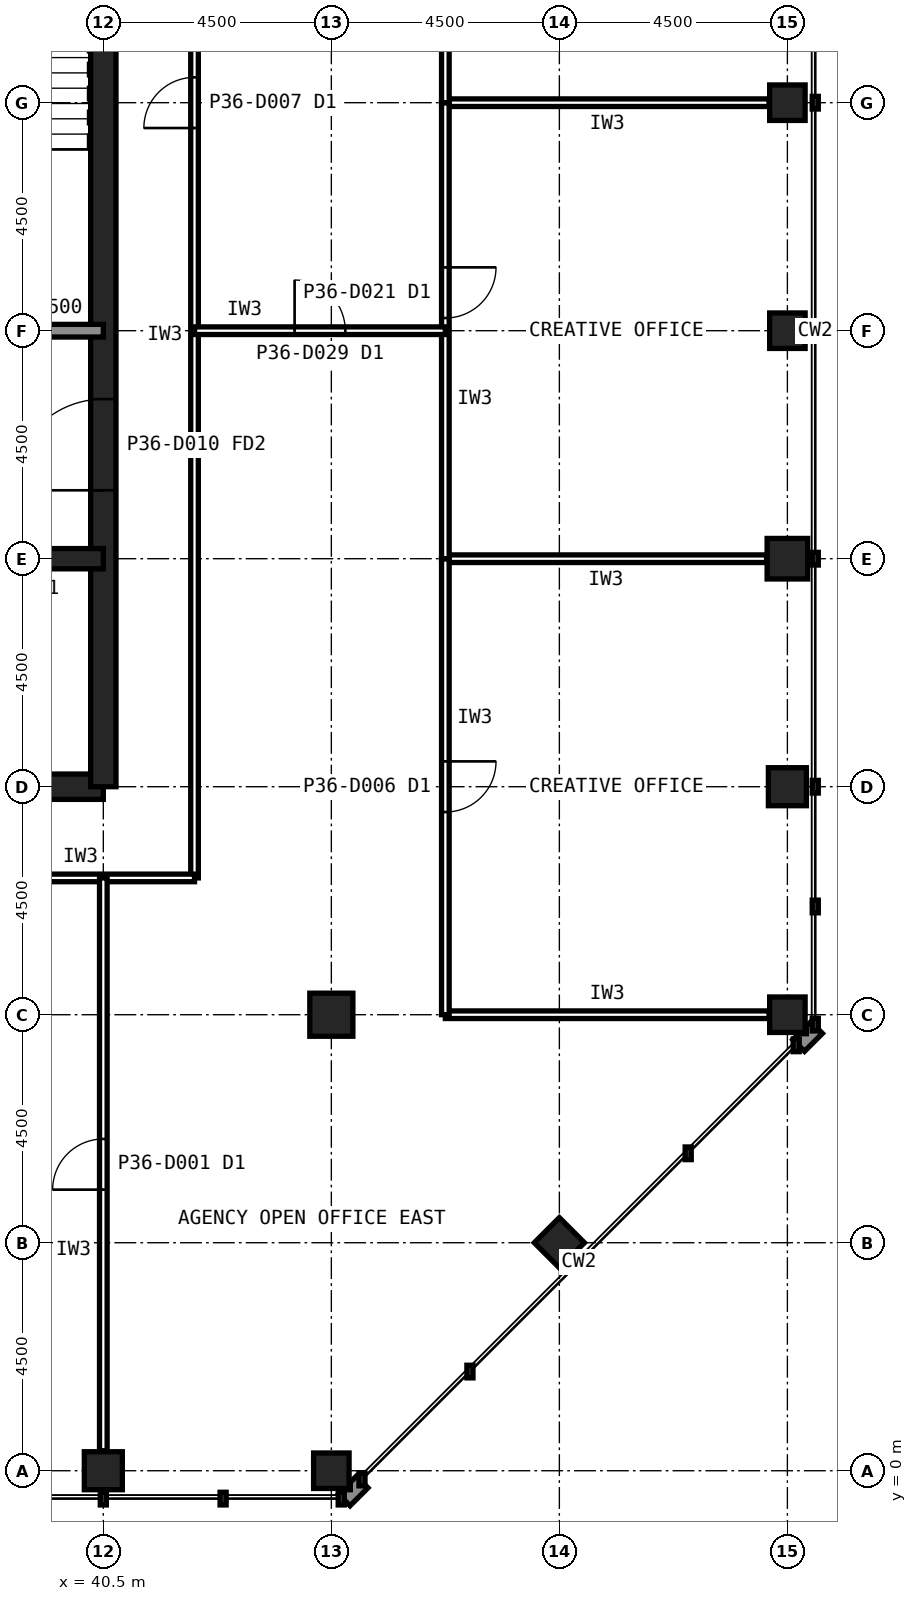
"""IFC4 building model, lengths in metres.
Left out: names, types, materials, properties, quantities, classifications, styles, units other than length and angle.
Written with IfcOpenShell. Run it as: python <this file> out.ifc"""

import sys

from ifc_helpers import new_model, si_unit, direction, frame, frame_2d, origin, origin_2d, place, context, subcontext, project, spatial, rectangle, hollow_rectangle, extrude, element, fill, save


model = new_model("IFC4")
c1 = context("Model", 3, precision=1e-05, world=origin(), true_north=direction((0.0, 1.0)))
c2 = subcontext(c1, "Body", "Model", "MODEL_VIEW")
j1 = project(units=[si_unit("LENGTHUNIT", "METRE"), si_unit("PLANEANGLEUNIT", "RADIAN")], contexts=[c1])
p1 = place(None, origin())
s1 = spatial("IfcSite", under=j1, at=p1, CompositionType="ELEMENT")
p2 = place(p1, origin())
s2 = spatial("IfcBuilding", under=s1, at=p2, CompositionType="ELEMENT")
p3 = place(p2, frame((0.0, 0.0, 151.6)))
s3 = spatial("IfcBuildingStorey", under=s2, at=p3, CompositionType="ELEMENT", Elevation=151.6)
p4 = place(p3, frame((40.5, 0.0, 0.0), z_axis=(0.0, 0.0, 1.0), x_axis=(1.0, 0.0, 0.0)))
e1 = element("IfcColumn", 1, at=p4, inside=s3, PredefinedType="COLUMN", context=c2, shape_type="SweptSolid", body=[
    extrude(hollow_rectangle(XDim=0.8, YDim=0.8, WallThickness=0.045, at=origin_2d()), origin(), (0.0, 0.0, 1.0), 4.0),
])
for number, where, z_axis, x_axis in (
    (2, (45.0, 0.0, 0.0), (0.0, 0.0, 1.0), (1.0, 0.0, 0.0)),
    (3, (54.0, 9.0, 0.0), (0.0, 0.0, 1.0), (1.0, 0.0, 0.0)),
):
    element("IfcColumn", number, at=place(p3, frame(where, z_axis=z_axis, x_axis=x_axis)), inside=s3, PredefinedType="COLUMN", context=c2, shape_type="SweptSolid", body=[
        extrude(hollow_rectangle(XDim=0.75, YDim=0.75, WallThickness=0.04, at=origin_2d()), origin(), (0.0, 0.0, 1.0), 4.0),
    ])
p5 = place(p3, frame((54.0, 13.5, 0.0), z_axis=(0.0, 0.0, 1.0), x_axis=(1.0, 0.0, 0.0)))
e4 = element("IfcColumn", 4, at=p5, inside=s3, PredefinedType="COLUMN", context=c2, shape_type="SweptSolid", body=[
    extrude(hollow_rectangle(XDim=0.8, YDim=0.8, WallThickness=0.045, at=origin_2d()), origin(), (0.0, 0.0, 1.0), 4.0),
])
p6 = place(p3, frame((54.0, 18.0, 0.0), z_axis=(0.0, 0.0, 1.0), x_axis=(1.0, 0.0, 0.0)))
e5 = element("IfcColumn", 5, at=p6, inside=s3, PredefinedType="COLUMN", context=c2, shape_type="SweptSolid", body=[
    extrude(hollow_rectangle(XDim=0.85, YDim=0.85, WallThickness=0.05, at=origin_2d()), origin(), (0.0, 0.0, 1.0), 4.0),
])
for number, where, z_axis, x_axis in (
    (6, (54.0, 22.5, 0.0), (0.0, 0.0, 1.0), (1.0, 0.0, 0.0)),
    (7, (54.0, 27.0, 0.0), (0.0, 0.0, 1.0), (1.0, 0.0, 0.0)),
    (8, (49.5, 4.5, 0.0), (0.0, 0.0, 1.0), (0.707, 0.707, 0.0)),
):
    element("IfcColumn", number, at=place(p3, frame(where, z_axis=z_axis, x_axis=x_axis)), inside=s3, PredefinedType="COLUMN", context=c2, shape_type="SweptSolid", body=[
        extrude(hollow_rectangle(XDim=0.75, YDim=0.75, WallThickness=0.04, at=origin_2d()), origin(), (0.0, 0.0, 1.0), 4.0),
    ])
p7 = place(p3, frame((45.0, 9.0, 0.0), z_axis=(0.0, 0.0, 1.0), x_axis=(1.0, 0.0, 0.0)))
e9 = element("IfcColumn", 9, at=p7, inside=s3, PredefinedType="COLUMN", context=c2, shape_type="SweptSolid", body=[
    extrude(hollow_rectangle(XDim=0.9, YDim=0.9, WallThickness=0.063, at=origin_2d()), origin(), (0.0, 0.0, 1.0), 4.0),
])
p8 = place(p3, frame((13.5, 13.5, 0.0), z_axis=(0.0, 0.0, 1.0), x_axis=(1.0, 0.0, 0.0)))
e10 = element("IfcWall", 10, at=p8, inside=s3, PredefinedType="SHEAR", context=c2, shape_type="SweptSolid", body=[
    extrude(rectangle(XDim=27.0, YDim=0.5, at=frame_2d((13.5, 0.0))), origin(), (0.0, 0.0, 1.0), 4.0),
])
p9 = place(p3, frame((40.5, 13.5, 0.0), z_axis=(0.0, 0.0, 1.0), x_axis=(0.0, 1.0, 0.0)))
e11 = element("IfcWall", 11, at=p9, inside=s3, PredefinedType="SHEAR", context=c2, shape_type="SweptSolid", body=[
    extrude(rectangle(XDim=27.0, YDim=0.5, at=frame_2d((13.5, 0.0))), origin(), (0.0, 0.0, 1.0), 4.0),
])
p10 = place(p9, frame((5.85, 0.0, 0.0)))
e12 = element("IfcOpeningElement", 12, at=p10, cuts=e11, PredefinedType="OPENING", context=c2, shape_type="SweptSolid", body=[
    extrude(rectangle(XDim=1.8, YDim=2.1, at=frame_2d((0.9, 1.05))), frame((0.0, 0.26, 0.0), z_axis=(0.0, -1.0, 0.0), x_axis=(1.0, 0.0, 0.0)), (0.0, 0.0, 1.0), 0.52),
])
p11 = place(p9, frame((19.65, 0.0, 0.0)))
e13 = element("IfcOpeningElement", 13, at=p11, cuts=e11, PredefinedType="OPENING", context=c2, shape_type="SweptSolid", body=[
    extrude(rectangle(XDim=1.2, YDim=2.1, at=frame_2d((0.6, 1.05))), frame((0.0, 0.26, 0.0), z_axis=(0.0, -1.0, 0.0), x_axis=(1.0, 0.0, 0.0)), (0.0, 0.0, 1.0), 0.52),
])
p12 = place(p3, frame((13.5, 18.0, 0.0), z_axis=(0.0, 0.0, 1.0), x_axis=(1.0, 0.0, 0.0)))
e14 = element("IfcWall", 14, at=p12, inside=s3, PredefinedType="SHEAR", context=c2, shape_type="SweptSolid", body=[
    extrude(rectangle(XDim=27.0, YDim=0.4, at=frame_2d((13.5, 0.0))), origin(), (0.0, 0.0, 1.0), 4.0),
])
p13 = place(p12, frame((24.3, 0.0, 0.0)))
e15 = element("IfcOpeningElement", 15, at=p13, cuts=e14, PredefinedType="OPENING", context=c2, shape_type="SweptSolid", body=[
    extrude(rectangle(XDim=0.9, YDim=2.1, at=frame_2d((0.45, 1.05))), frame((0.0, 0.21, 0.0), z_axis=(0.0, -1.0, 0.0), x_axis=(1.0, 0.0, 0.0)), (0.0, 0.0, 1.0), 0.42),
])
p14 = place(p12, frame((5.45, 0.0, 0.0)))
e16 = element("IfcOpeningElement", 16, at=p14, cuts=e14, PredefinedType="OPENING", context=c2, shape_type="SweptSolid", body=[
    extrude(rectangle(XDim=1.1, YDim=2.1, at=frame_2d((0.55, 1.05))), frame((0.0, 0.21, 0.0), z_axis=(0.0, -1.0, 0.0), x_axis=(1.0, 0.0, 0.0)), (0.0, 0.0, 1.0), 0.42),
])
p15 = place(p12, frame((8.45, 0.0, 0.0)))
e17 = element("IfcOpeningElement", 17, at=p15, cuts=e14, PredefinedType="OPENING", context=c2, shape_type="SweptSolid", body=[
    extrude(rectangle(XDim=1.1, YDim=2.1, at=frame_2d((0.55, 1.05))), frame((0.0, 0.21, 0.0), z_axis=(0.0, -1.0, 0.0), x_axis=(1.0, 0.0, 0.0)), (0.0, 0.0, 1.0), 0.42),
])
p16 = place(p12, frame((11.45, 0.0, 0.0)))
e18 = element("IfcOpeningElement", 18, at=p16, cuts=e14, PredefinedType="OPENING", context=c2, shape_type="SweptSolid", body=[
    extrude(rectangle(XDim=1.1, YDim=2.1, at=frame_2d((0.55, 1.05))), frame((0.0, 0.21, 0.0), z_axis=(0.0, -1.0, 0.0), x_axis=(1.0, 0.0, 0.0)), (0.0, 0.0, 1.0), 0.42),
])
p17 = place(p12, frame((14.45, 0.0, 0.0)))
e19 = element("IfcOpeningElement", 19, at=p17, cuts=e14, PredefinedType="OPENING", context=c2, shape_type="SweptSolid", body=[
    extrude(rectangle(XDim=1.1, YDim=2.1, at=frame_2d((0.55, 1.05))), frame((0.0, 0.21, 0.0), z_axis=(0.0, -1.0, 0.0), x_axis=(1.0, 0.0, 0.0)), (0.0, 0.0, 1.0), 0.42),
])
p18 = place(p12, frame((17.45, 0.0, 0.0)))
e20 = element("IfcOpeningElement", 20, at=p18, cuts=e14, PredefinedType="OPENING", context=c2, shape_type="SweptSolid", body=[
    extrude(rectangle(XDim=1.1, YDim=2.1, at=frame_2d((0.55, 1.05))), frame((0.0, 0.21, 0.0), z_axis=(0.0, -1.0, 0.0), x_axis=(1.0, 0.0, 0.0)), (0.0, 0.0, 1.0), 0.42),
])
p19 = place(p12, frame((20.45, 0.0, 0.0)))
e21 = element("IfcOpeningElement", 21, at=p19, cuts=e14, PredefinedType="OPENING", context=c2, shape_type="SweptSolid", body=[
    extrude(rectangle(XDim=1.1, YDim=2.1, at=frame_2d((0.55, 1.05))), frame((0.0, 0.21, 0.0), z_axis=(0.0, -1.0, 0.0), x_axis=(1.0, 0.0, 0.0)), (0.0, 0.0, 1.0), 0.42),
])
p20 = place(p12, frame((1.6, 0.0, 0.0)))
e22 = element("IfcOpeningElement", 22, at=p20, cuts=e14, PredefinedType="OPENING", context=c2, shape_type="SweptSolid", body=[
    extrude(rectangle(XDim=1.3, YDim=2.2, at=frame_2d((0.65, 1.1))), frame((0.0, 0.21, 0.0), z_axis=(0.0, -1.0, 0.0), x_axis=(1.0, 0.0, 0.0)), (0.0, 0.0, 1.0), 0.42),
])
p21 = place(p3, frame((13.5, 22.5, 0.0), z_axis=(0.0, 0.0, 1.0), x_axis=(1.0, 0.0, 0.0)))
e23 = element("IfcWall", 23, at=p21, inside=s3, PredefinedType="SOLIDWALL", context=c2, shape_type="SweptSolid", body=[
    extrude(rectangle(XDim=27.0, YDim=0.25, at=frame_2d((13.5, 0.0))), origin(), (0.0, 0.0, 1.0), 3.84),
])
p22 = place(p21, frame((1.65, 0.0, 0.0)))
e24 = element("IfcOpeningElement", 24, at=p22, cuts=e23, PredefinedType="OPENING", context=c2, shape_type="SweptSolid", body=[
    extrude(rectangle(XDim=1.2, YDim=2.1, at=frame_2d((0.6, 1.05))), frame((0.0, 0.135, 0.0), z_axis=(0.0, -1.0, 0.0), x_axis=(1.0, 0.0, 0.0)), (0.0, 0.0, 1.0), 0.27),
])
p23 = place(p21, frame((6.025, 0.0, 0.0)))
e25 = element("IfcOpeningElement", 25, at=p23, cuts=e23, PredefinedType="OPENING", context=c2, shape_type="SweptSolid", body=[
    extrude(rectangle(XDim=1.0, YDim=2.1, at=frame_2d((0.5, 1.05))), frame((0.0, 0.135, 0.0), z_axis=(0.0, -1.0, 0.0), x_axis=(1.0, 0.0, 0.0)), (0.0, 0.0, 1.0), 0.27),
])
p24 = place(p21, frame((10.525, 0.0, 0.0)))
e26 = element("IfcOpeningElement", 26, at=p24, cuts=e23, PredefinedType="OPENING", context=c2, shape_type="SweptSolid", body=[
    extrude(rectangle(XDim=1.0, YDim=2.1, at=frame_2d((0.5, 1.05))), frame((0.0, 0.135, 0.0), z_axis=(0.0, -1.0, 0.0), x_axis=(1.0, 0.0, 0.0)), (0.0, 0.0, 1.0), 0.27),
])
p25 = place(p21, frame((19.75, 0.0, 0.0)))
e27 = element("IfcOpeningElement", 27, at=p25, cuts=e23, PredefinedType="OPENING", context=c2, shape_type="SweptSolid", body=[
    extrude(rectangle(XDim=1.0, YDim=2.1, at=frame_2d((0.5, 1.05))), frame((0.0, 0.135, 0.0), z_axis=(0.0, -1.0, 0.0), x_axis=(1.0, 0.0, 0.0)), (0.0, 0.0, 1.0), 0.27),
])
p26 = place(p21, frame((15.05, 0.0, 0.0)))
e28 = element("IfcOpeningElement", 28, at=p26, cuts=e23, PredefinedType="OPENING", context=c2, shape_type="SweptSolid", body=[
    extrude(rectangle(XDim=1.4, YDim=2.4, at=frame_2d((0.7, 1.2))), frame((0.0, 0.135, 0.0), z_axis=(0.0, -1.0, 0.0), x_axis=(1.0, 0.0, 0.0)), (0.0, 0.0, 1.0), 0.27),
])
p27 = place(p3, frame((42.3, 11.7, 0.0), z_axis=(0.0, 0.0, 1.0), x_axis=(0.0, 1.0, 0.0)))
e29 = element("IfcWall", 29, at=p27, inside=s3, PredefinedType="PARTITIONING", context=c2, shape_type="SweptSolid", body=[
    extrude(rectangle(XDim=28.8, YDim=0.15, at=frame_2d((14.4, 0.0))), origin(), (0.0, 0.0, 1.0), 3.84),
])
p28 = place(p27, frame((13.9, 0.0, 0.0)))
e30 = element("IfcOpeningElement", 30, at=p28, cuts=e29, PredefinedType="OPENING", context=c2, shape_type="SweptSolid", body=[
    extrude(rectangle(XDim=1.0, YDim=2.1, at=frame_2d((0.5, 1.05))), frame((0.0, 0.085, 0.0), z_axis=(0.0, -1.0, 0.0), x_axis=(1.0, 0.0, 0.0)), (0.0, 0.0, 1.0), 0.17),
])
p29 = place(p3, frame((37.8, 11.7, 0.0), z_axis=(0.0, 0.0, 1.0), x_axis=(1.0, 0.0, 0.0)))
e31 = element("IfcWall", 31, at=p29, inside=s3, PredefinedType="PARTITIONING", context=c2, shape_type="SweptSolid", body=[
    extrude(rectangle(XDim=4.5, YDim=0.15, at=frame_2d((2.25, 0.0))), origin(), (0.0, 0.0, 1.0), 3.84),
])
p30 = place(p3, frame((47.25, 9.0, 0.0), z_axis=(0.0, 0.0, 1.0), x_axis=(1.0, 0.0, 0.0)))
e32 = element("IfcWall", 32, at=p30, inside=s3, PredefinedType="PARTITIONING", context=c2, shape_type="SweptSolid", body=[
    extrude(rectangle(XDim=6.365, YDim=0.15, at=frame_2d((3.183, 0.0))), origin(), (0.0, 0.0, 1.0), 3.229),
])
p31 = place(p3, frame((53.565, 18.0, 0.0), z_axis=(0.0, 0.0, 1.0), x_axis=(-1.0, 0.0, 0.0)))
e33 = element("IfcWall", 33, at=p31, inside=s3, PredefinedType="PARTITIONING", context=c2, shape_type="SweptSolid", body=[
    extrude(rectangle(XDim=6.315, YDim=0.15, at=frame_2d((3.157, 0.0))), origin(), (0.0, 0.0, 1.0), 2.989),
])
p32 = place(p3, frame((47.25, 18.0, 0.0), z_axis=(0.0, 0.0, 1.0), x_axis=(0.0, -1.0, 0.0)))
e34 = element("IfcWall", 34, at=p32, inside=s3, PredefinedType="PARTITIONING", context=c2, shape_type="SweptSolid", body=[
    extrude(rectangle(XDim=9.0, YDim=0.15, at=frame_2d((4.5, 0.0))), origin(), (0.0, 0.0, 1.0), 3.84),
])
p33 = place(p32, frame((4.0, 0.0, 0.0)))
e35 = element("IfcOpeningElement", 35, at=p33, cuts=e34, PredefinedType="OPENING", context=c2, shape_type="SweptSolid", body=[
    extrude(rectangle(XDim=1.0, YDim=2.1, at=frame_2d((0.5, 1.05))), frame((0.0, 0.085, 0.0), z_axis=(0.0, -1.0, 0.0), x_axis=(1.0, 0.0, 0.0)), (0.0, 0.0, 1.0), 0.17),
])
p34 = place(p3, frame((53.615, 27.0, 0.0), z_axis=(0.0, 0.0, 1.0), x_axis=(-1.0, 0.0, 0.0)))
e36 = element("IfcWall", 36, at=p34, inside=s3, PredefinedType="PARTITIONING", context=c2, shape_type="SweptSolid", body=[
    extrude(rectangle(XDim=6.365, YDim=0.15, at=frame_2d((3.183, 0.0))), origin(), (0.0, 0.0, 1.0), 2.989),
])
p35 = place(p3, frame((47.25, 27.0, 0.0), z_axis=(0.0, 0.0, 1.0), x_axis=(0.0, -1.0, 0.0)))
e37 = element("IfcWall", 37, at=p35, inside=s3, PredefinedType="PARTITIONING", context=c2, shape_type="SweptSolid", body=[
    extrude(rectangle(XDim=9.0, YDim=0.15, at=frame_2d((4.5, 0.0))), origin(), (0.0, 0.0, 1.0), 3.84),
])
p36 = place(p35, frame((3.25, 0.0, 0.0)))
e38 = element("IfcOpeningElement", 38, at=p36, cuts=e37, PredefinedType="OPENING", context=c2, shape_type="SweptSolid", body=[
    extrude(rectangle(XDim=1.0, YDim=2.1, at=frame_2d((0.5, 1.05))), frame((0.0, 0.085, 0.0), z_axis=(0.0, -1.0, 0.0), x_axis=(1.0, 0.0, 0.0)), (0.0, 0.0, 1.0), 0.17),
])
p37 = place(p3, frame((47.25, 36.0, 0.0), z_axis=(0.0, 0.0, 1.0), x_axis=(0.0, -1.0, 0.0)))
e39 = element("IfcWall", 39, at=p37, inside=s3, PredefinedType="PARTITIONING", context=c2, shape_type="SweptSolid", body=[
    extrude(rectangle(XDim=9.0, YDim=0.15, at=frame_2d((4.5, 0.0))), origin(), (0.0, 0.0, 1.0), 3.84),
])
p38 = place(p37, frame((4.0, 0.0, 0.0)))
e40 = element("IfcOpeningElement", 40, at=p38, cuts=e39, PredefinedType="OPENING", context=c2, shape_type="SweptSolid", body=[
    extrude(rectangle(XDim=1.0, YDim=2.1, at=frame_2d((0.5, 1.05))), frame((0.0, 0.085, 0.0), z_axis=(0.0, -1.0, 0.0), x_axis=(1.0, 0.0, 0.0)), (0.0, 0.0, 1.0), 0.17),
])
p39 = place(p3, frame((40.5, 0.42, 0.0), z_axis=(0.0, 0.0, 1.0), x_axis=(0.0, 1.0, 0.0)))
e41 = element("IfcWall", 41, at=p39, inside=s3, PredefinedType="PARTITIONING", context=c2, shape_type="SweptSolid", body=[
    extrude(rectangle(XDim=11.28, YDim=0.15, at=frame_2d((5.64, 0.0))), origin(), (0.0, 0.0, 1.0), 2.989),
])
p40 = place(p39, frame((5.14, 0.0, 0.0)))
e42 = element("IfcOpeningElement", 42, at=p40, cuts=e41, PredefinedType="OPENING", context=c2, shape_type="SweptSolid", body=[
    extrude(rectangle(XDim=1.0, YDim=2.1, at=frame_2d((0.5, 1.05))), frame((0.0, 0.085, 0.0), z_axis=(0.0, -1.0, 0.0), x_axis=(1.0, 0.0, 0.0)), (0.0, 0.0, 1.0), 0.17),
])
p41 = place(p3, frame((42.3, 22.5, 0.0), z_axis=(0.0, 0.0, 1.0), x_axis=(1.0, 0.0, 0.0)))
e43 = element("IfcWall", 43, at=p41, inside=s3, PredefinedType="PARTITIONING", context=c2, shape_type="SweptSolid", body=[
    extrude(rectangle(XDim=4.95, YDim=0.15, at=frame_2d((2.475, 0.0))), origin(), (0.0, 0.0, 1.0), 2.989),
])
p42 = place(p41, frame((1.975, 0.0, 0.0)))
e44 = element("IfcOpeningElement", 44, at=p42, cuts=e43, PredefinedType="OPENING", context=c2, shape_type="SweptSolid", body=[
    extrude(rectangle(XDim=1.0, YDim=2.1, at=frame_2d((0.5, 1.05))), frame((0.0, 0.085, 0.0), z_axis=(0.0, -1.0, 0.0), x_axis=(1.0, 0.0, 0.0)), (0.0, 0.0, 1.0), 0.17),
])
p43 = place(p10, origin())
e45 = element("IfcDoor", 45, at=p43, inside=s3, OperationType="SINGLE_SWING_LEFT", PredefinedType="DOOR", context=c2, shape_type="SweptSolid", body=[
    extrude(rectangle(XDim=1.8, YDim=2.1, at=frame_2d((0.9, 1.05))), frame((0.0, 0.025, 0.0), z_axis=(0.0, -1.0, 0.0), x_axis=(1.0, 0.0, 0.0)), (0.0, 0.0, 1.0), 0.05),
])
fill(e12, e45)
p44 = place(p28, origin())
e46 = element("IfcDoor", 46, at=p44, inside=s3, OperationType="SINGLE_SWING_LEFT", PredefinedType="DOOR", context=c2, shape_type="SweptSolid", body=[
    extrude(rectangle(XDim=1.0, YDim=2.1, at=frame_2d((0.5, 1.05))), frame((0.0, 0.025, 0.0), z_axis=(0.0, -1.0, 0.0), x_axis=(1.0, 0.0, 0.0)), (0.0, 0.0, 1.0), 0.05),
])
fill(e30, e46)
p45 = place(p33, origin())
e47 = element("IfcDoor", 47, at=p45, inside=s3, OperationType="SINGLE_SWING_LEFT", PredefinedType="DOOR", context=c2, shape_type="SweptSolid", body=[
    extrude(rectangle(XDim=1.0, YDim=2.1, at=frame_2d((0.5, 1.05))), frame((0.0, 0.025, 0.0), z_axis=(0.0, -1.0, 0.0), x_axis=(1.0, 0.0, 0.0)), (0.0, 0.0, 1.0), 0.05),
])
fill(e35, e47)
p46 = place(p36, origin())
e48 = element("IfcDoor", 48, at=p46, inside=s3, OperationType="SINGLE_SWING_LEFT", PredefinedType="DOOR", context=c2, shape_type="SweptSolid", body=[
    extrude(rectangle(XDim=1.0, YDim=2.1, at=frame_2d((0.5, 1.05))), frame((0.0, 0.025, 0.0), z_axis=(0.0, -1.0, 0.0), x_axis=(1.0, 0.0, 0.0)), (0.0, 0.0, 1.0), 0.05),
])
fill(e38, e48)
p47 = place(p40, origin())
e49 = element("IfcDoor", 49, at=p47, inside=s3, OperationType="SINGLE_SWING_LEFT", PredefinedType="DOOR", context=c2, shape_type="SweptSolid", body=[
    extrude(rectangle(XDim=1.0, YDim=2.1, at=frame_2d((0.5, 1.05))), frame((0.0, 0.025, 0.0), z_axis=(0.0, -1.0, 0.0), x_axis=(1.0, 0.0, 0.0)), (0.0, 0.0, 1.0), 0.05),
])
fill(e42, e49)
p48 = place(p42, origin())
e50 = element("IfcDoor", 50, at=p48, inside=s3, OperationType="SINGLE_SWING_LEFT", PredefinedType="DOOR", context=c2, shape_type="SweptSolid", body=[
    extrude(rectangle(XDim=1.0, YDim=2.1, at=frame_2d((0.5, 1.05))), frame((0.0, 0.025, 0.0), z_axis=(0.0, -1.0, 0.0), x_axis=(1.0, 0.0, 0.0)), (0.0, 0.0, 1.0), 0.05),
])
fill(e44, e50)
save(model, sys.argv[1])
